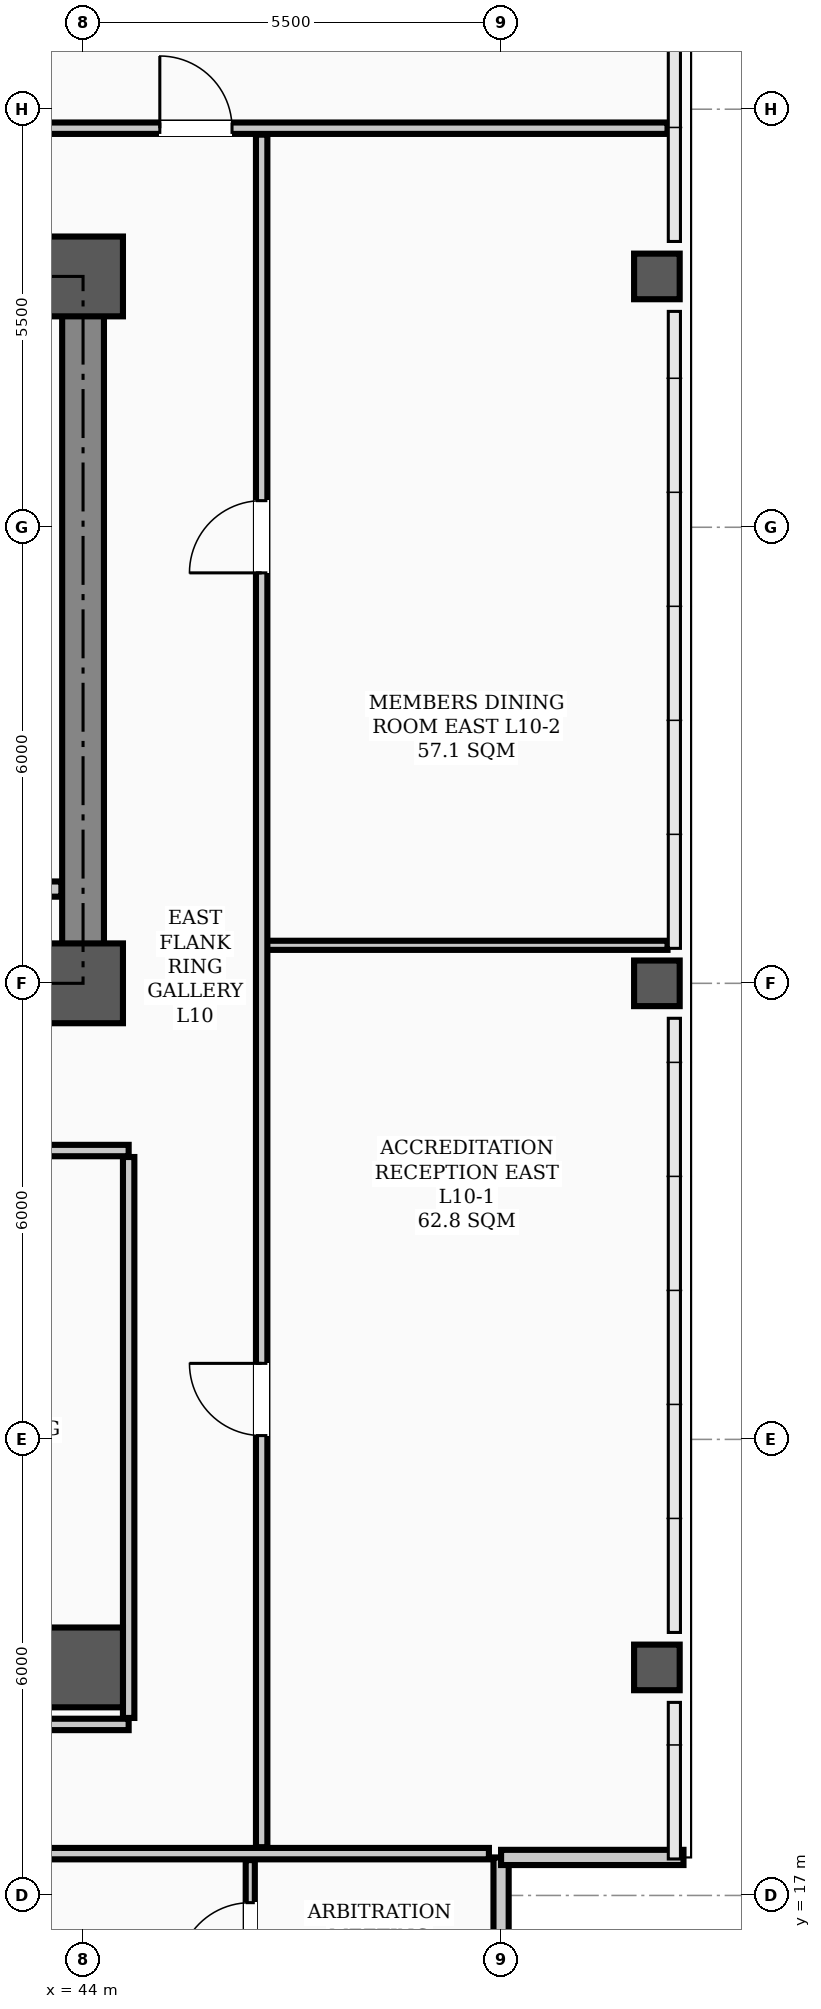
"""IFC4 building model, lengths in metres.
Left out: names, types, materials, properties, quantities, classifications, styles, units other than length and angle.
Written with IfcOpenShell. Run it as: python <this file> out.ifc"""

import sys

from ifc_helpers import new_model, si_unit, direction, frame, frame_2d, origin, origin_2d, place, context, subcontext, project, spatial, rectangle, hollow_rectangle, extrude, element, fill, save


model = new_model("IFC4")
c1 = context("Model", 3, precision=1e-05, world=origin(), true_north=direction((0.0, 1.0)))
c2 = subcontext(c1, "Body", "Model", "MODEL_VIEW")
j1 = project(units=[si_unit("LENGTHUNIT", "METRE"), si_unit("PLANEANGLEUNIT", "RADIAN")], contexts=[c1])
p1 = place(None, origin())
s1 = spatial("IfcSite", under=j1, at=p1, CompositionType="ELEMENT")
p2 = place(p1, origin())
s2 = spatial("IfcBuilding", under=s1, at=p2, CompositionType="ELEMENT")
p3 = place(p2, frame((0.0, 0.0, 42.1)))
s3 = spatial("IfcBuildingStorey", under=s2, at=p3, CompositionType="ELEMENT", Elevation=42.1)
for number, where, z_axis, x_axis in (
    (1, (44.0, 29.0, 0.0), (0.0, 0.0, 1.0), (1.0, 0.0, 0.0)),
    (2, (44.0, 38.3, 0.0), (0.0, 0.0, 1.0), (1.0, 0.0, 0.0)),
    (3, (44.0, 20.0, 0.0), (0.0, 0.0, 1.0), (1.0, 0.0, 0.0)),
):
    element("IfcColumn", number, at=place(p3, frame(where, z_axis=z_axis, x_axis=x_axis)), inside=s3, PredefinedType="COLUMN", context=c2, shape_type="SweptSolid", body=[
        extrude(hollow_rectangle(XDim=1.05, YDim=1.05, WallThickness=0.038, InnerFilletRadius=0.019, OuterFilletRadius=0.057, at=origin_2d()), origin(), (0.0, 0.0, 1.0), 3.9),
    ])
for number, where, z_axis, x_axis in (
    (4, (51.55, 20.0, 0.0), (0.0, 0.0, 1.0), (1.0, 0.0, 0.0)),
    (5, (51.55, 29.0, 0.0), (0.0, 0.0, 1.0), (1.0, 0.0, 0.0)),
    (6, (51.55, 38.3, 0.0), (0.0, 0.0, 1.0), (1.0, 0.0, 0.0)),
):
    element("IfcColumn", number, at=place(p3, frame(where, z_axis=z_axis, x_axis=x_axis)), inside=s3, PredefinedType="COLUMN", context=c2, shape_type="SweptSolid", body=[
        extrude(hollow_rectangle(XDim=0.6, YDim=0.6, WallThickness=0.026, InnerFilletRadius=0.013, OuterFilletRadius=0.039, at=origin_2d()), origin(), (0.0, 0.0, 1.0), 3.9),
    ])
for number, where, z_axis, x_axis in (
    (7, (49.5, 15.1, 0.0), (0.0, 0.0, 1.0), (0.0, 1.0, 0.0)),
    (8, (49.5, 17.5, 0.0), (0.0, 0.0, 1.0), (1.0, 0.0, 0.0)),
):
    element("IfcWall", number, at=place(p3, frame(where, z_axis=z_axis, x_axis=x_axis)), inside=s3, PredefinedType="PARAPET", context=c2, shape_type="SweptSolid", body=[
        extrude(rectangle(XDim=2.4, YDim=0.2, at=frame_2d((1.2, 0.0))), origin(), (0.0, 0.0, 1.0), 1.2),
    ])
p4 = place(p3, frame((13.5, 29.0, 0.0), z_axis=(0.0, 0.0, 1.0), x_axis=(1.0, 0.0, 0.0)))
e9 = element("IfcWall", 9, at=p4, inside=s3, PredefinedType="SHEAR", context=c2, shape_type="SweptSolid", body=[
    extrude(rectangle(XDim=30.5, YDim=0.55, at=frame_2d((15.25, 0.0))), origin(), (0.0, 0.0, 1.0), 3.72),
])
p5 = place(p4, frame((1.75, 0.0, 0.0)))
e10 = element("IfcOpeningElement", 10, at=p5, cuts=e9, PredefinedType="OPENING", context=c2, shape_type="SweptSolid", body=[
    extrude(rectangle(XDim=1.1, YDim=2.08, at=frame_2d((0.55, 1.04))), frame((0.0, 0.285, 0.0), z_axis=(0.0, -1.0, 0.0), x_axis=(1.0, 0.0, 0.0)), (0.0, 0.0, 1.0), 0.57),
])
p6 = place(p4, frame((26.7, 0.0, 0.0)))
e11 = element("IfcOpeningElement", 11, at=p6, cuts=e9, PredefinedType="OPENING", context=c2, shape_type="SweptSolid", body=[
    extrude(rectangle(XDim=1.1, YDim=2.08, at=frame_2d((0.55, 1.04))), frame((0.0, 0.285, 0.0), z_axis=(0.0, -1.0, 0.0), x_axis=(1.0, 0.0, 0.0)), (0.0, 0.0, 1.0), 0.57),
])
p7 = place(p4, frame((6.8, 0.0, 0.0)))
e12 = element("IfcOpeningElement", 12, at=p7, cuts=e9, PredefinedType="OPENING", context=c2, shape_type="SweptSolid", body=[
    extrude(rectangle(XDim=1.1, YDim=2.08, at=frame_2d((0.55, 1.04))), frame((0.0, 0.285, 0.0), z_axis=(0.0, -1.0, 0.0), x_axis=(1.0, 0.0, 0.0)), (0.0, 0.0, 1.0), 0.57),
])
p8 = place(p4, frame((13.2, 0.0, 0.0)))
e13 = element("IfcOpeningElement", 13, at=p8, cuts=e9, PredefinedType="OPENING", context=c2, shape_type="SweptSolid", body=[
    extrude(rectangle(XDim=1.6, YDim=2.08, at=frame_2d((0.8, 1.04))), frame((0.0, 0.285, 0.0), z_axis=(0.0, -1.0, 0.0), x_axis=(1.0, 0.0, 0.0)), (0.0, 0.0, 1.0), 0.57),
])
p9 = place(p4, frame((20.525, 0.0, 0.0)))
e14 = element("IfcOpeningElement", 14, at=p9, cuts=e9, PredefinedType="OPENING", context=c2, shape_type="SweptSolid", body=[
    extrude(rectangle(XDim=0.95, YDim=2.08, at=frame_2d((0.475, 1.04))), frame((0.0, 0.285, 0.0), z_axis=(0.0, -1.0, 0.0), x_axis=(1.0, 0.0, 0.0)), (0.0, 0.0, 1.0), 0.57),
])
p10 = place(p3, frame((13.5, 38.3, 0.0), z_axis=(0.0, 0.0, 1.0), x_axis=(1.0, 0.0, 0.0)))
e15 = element("IfcWall", 15, at=p10, inside=s3, PredefinedType="SHEAR", context=c2, shape_type="SweptSolid", body=[
    extrude(rectangle(XDim=30.5, YDim=0.55, at=frame_2d((15.25, 0.0))), origin(), (0.0, 0.0, 1.0), 3.72),
])
p11 = place(p3, frame((44.0, 29.35, 0.0), z_axis=(0.0, 0.0, 1.0), x_axis=(0.0, 1.0, 0.0)))
e16 = element("IfcWall", 16, at=p11, inside=s3, PredefinedType="SHEAR", context=c2, shape_type="SweptSolid", body=[
    extrude(rectangle(XDim=8.6, YDim=0.55, at=frame_2d((4.3, 0.0))), origin(), (0.0, 0.0, 1.0), 3.72),
])
p12 = place(p3, frame((42.4, 30.24, 0.0), z_axis=(0.0, 0.0, 1.0), x_axis=(1.0, 0.0, 0.0)))
e17 = element("IfcWall", 17, at=p12, inside=s3, PredefinedType="STANDARD", context=c2, shape_type="SweptSolid", body=[
    extrude(rectangle(XDim=1.315, YDim=0.2, at=frame_2d((0.658, 0.0))), origin(), (0.0, 0.0, 1.0), 3.1),
])
p13 = place(p3, frame((12.9, 26.8, 0.0), z_axis=(0.0, 0.0, 1.0), x_axis=(1.0, 0.0, 0.0)))
e18 = element("IfcWall", 18, at=p13, inside=s3, PredefinedType="PARTITIONING", context=c2, shape_type="SweptSolid", body=[
    extrude(rectangle(XDim=31.7, YDim=0.15, at=frame_2d((15.85, 0.0))), origin(), (0.0, 0.0, 1.0), 3.1),
])
p14 = place(p13, frame((13.6, 0.0, 0.0)))
e19 = element("IfcOpeningElement", 19, at=p14, cuts=e18, PredefinedType="OPENING", context=c2, shape_type="SweptSolid", body=[
    extrude(rectangle(XDim=1.6, YDim=2.08, at=frame_2d((0.8, 1.04))), frame((0.0, 0.085, 0.0), z_axis=(0.0, -1.0, 0.0), x_axis=(1.0, 0.0, 0.0)), (0.0, 0.0, 1.0), 0.17),
])
p15 = place(p13, frame((2.875, 0.0, 0.0)))
e20 = element("IfcOpeningElement", 20, at=p15, cuts=e18, PredefinedType="OPENING", context=c2, shape_type="SweptSolid", body=[
    extrude(rectangle(XDim=0.95, YDim=2.08, at=frame_2d((0.475, 1.04))), frame((0.0, 0.085, 0.0), z_axis=(0.0, -1.0, 0.0), x_axis=(1.0, 0.0, 0.0)), (0.0, 0.0, 1.0), 0.17),
])
p16 = place(p13, frame((8.625, 0.0, 0.0)))
e21 = element("IfcOpeningElement", 21, at=p16, cuts=e18, PredefinedType="OPENING", context=c2, shape_type="SweptSolid", body=[
    extrude(rectangle(XDim=0.95, YDim=2.08, at=frame_2d((0.475, 1.04))), frame((0.0, 0.085, 0.0), z_axis=(0.0, -1.0, 0.0), x_axis=(1.0, 0.0, 0.0)), (0.0, 0.0, 1.0), 0.17),
])
p17 = place(p13, frame((16.075, 0.0, 0.0)))
e22 = element("IfcOpeningElement", 22, at=p17, cuts=e18, PredefinedType="OPENING", context=c2, shape_type="SweptSolid", body=[
    extrude(rectangle(XDim=0.95, YDim=2.08, at=frame_2d((0.475, 1.04))), frame((0.0, 0.085, 0.0), z_axis=(0.0, -1.0, 0.0), x_axis=(1.0, 0.0, 0.0)), (0.0, 0.0, 1.0), 0.17),
])
p18 = place(p13, frame((21.875, 0.0, 0.0)))
e23 = element("IfcOpeningElement", 23, at=p18, cuts=e18, PredefinedType="OPENING", context=c2, shape_type="SweptSolid", body=[
    extrude(rectangle(XDim=0.95, YDim=2.08, at=frame_2d((0.475, 1.04))), frame((0.0, 0.085, 0.0), z_axis=(0.0, -1.0, 0.0), x_axis=(1.0, 0.0, 0.0)), (0.0, 0.0, 1.0), 0.17),
])
p19 = place(p13, frame((29.025, 0.0, 0.0)))
e24 = element("IfcOpeningElement", 24, at=p19, cuts=e18, PredefinedType="OPENING", context=c2, shape_type="SweptSolid", body=[
    extrude(rectangle(XDim=0.95, YDim=2.08, at=frame_2d((0.475, 1.04))), frame((0.0, 0.085, 0.0), z_axis=(0.0, -1.0, 0.0), x_axis=(1.0, 0.0, 0.0)), (0.0, 0.0, 1.0), 0.17),
])
p20 = place(p3, frame((4.66, 17.55, 0.0), z_axis=(0.0, 0.0, 1.0), x_axis=(1.0, 0.0, 0.0)))
e25 = element("IfcWall", 25, at=p20, inside=s3, PredefinedType="PARTITIONING", context=c2, shape_type="SweptSolid", body=[
    extrude(rectangle(XDim=44.68, YDim=0.15, at=frame_2d((22.34, 0.0))), origin(), (0.0, 0.0, 1.0), 3.1),
])
p21 = place(p20, frame((7.34, 0.0, 0.0)))
e26 = element("IfcOpeningElement", 26, at=p21, cuts=e25, PredefinedType="OPENING", context=c2, shape_type="SweptSolid", body=[
    extrude(rectangle(XDim=0.95, YDim=2.08, at=frame_2d((0.475, 1.04))), frame((0.0, 0.085, 0.0), z_axis=(0.0, -1.0, 0.0), x_axis=(1.0, 0.0, 0.0)), (0.0, 0.0, 1.0), 0.17),
])
p22 = place(p20, frame((12.465, 0.0, 0.0)))
e27 = element("IfcOpeningElement", 27, at=p22, cuts=e25, PredefinedType="OPENING", context=c2, shape_type="SweptSolid", body=[
    extrude(rectangle(XDim=0.95, YDim=2.08, at=frame_2d((0.475, 1.04))), frame((0.0, 0.085, 0.0), z_axis=(0.0, -1.0, 0.0), x_axis=(1.0, 0.0, 0.0)), (0.0, 0.0, 1.0), 0.17),
])
p23 = place(p20, frame((29.265, 0.0, 0.0)))
e28 = element("IfcOpeningElement", 28, at=p23, cuts=e25, PredefinedType="OPENING", context=c2, shape_type="SweptSolid", body=[
    extrude(rectangle(XDim=0.95, YDim=2.08, at=frame_2d((0.475, 1.04))), frame((0.0, 0.085, 0.0), z_axis=(0.0, -1.0, 0.0), x_axis=(1.0, 0.0, 0.0)), (0.0, 0.0, 1.0), 0.17),
])
p24 = place(p20, frame((37.265, 0.0, 0.0)))
e29 = element("IfcOpeningElement", 29, at=p24, cuts=e25, PredefinedType="OPENING", context=c2, shape_type="SweptSolid", body=[
    extrude(rectangle(XDim=0.95, YDim=2.08, at=frame_2d((0.475, 1.04))), frame((0.0, 0.085, 0.0), z_axis=(0.0, -1.0, 0.0), x_axis=(1.0, 0.0, 0.0)), (0.0, 0.0, 1.0), 0.17),
])
p25 = place(p3, frame((28.4, 19.25, 0.0), z_axis=(0.0, 0.0, 1.0), x_axis=(1.0, 0.0, 0.0)))
e30 = element("IfcWall", 30, at=p25, inside=s3, PredefinedType="PARTITIONING", context=c2, shape_type="SweptSolid", body=[
    extrude(rectangle(XDim=16.2, YDim=0.15, at=frame_2d((8.1, 0.0))), origin(), (0.0, 0.0, 1.0), 3.1),
])
p26 = place(p3, frame((46.35, 29.5, 0.0), z_axis=(0.0, 0.0, 1.0), x_axis=(1.0, 0.0, 0.0)))
e31 = element("IfcWall", 31, at=p26, inside=s3, PredefinedType="PARTITIONING", context=c2, shape_type="SweptSolid", body=[
    extrude(rectangle(XDim=5.34, YDim=0.12, at=frame_2d((2.67, 0.0))), origin(), (0.0, 0.0, 1.0), 3.0),
])
p27 = place(p3, frame((2.31, 40.25, 0.0), z_axis=(0.0, 0.0, 1.0), x_axis=(1.0, 0.0, 0.0)))
e32 = element("IfcWall", 32, at=p27, inside=s3, PredefinedType="PARTITIONING", context=c2, shape_type="SweptSolid", body=[
    extrude(rectangle(XDim=49.38, YDim=0.15, at=frame_2d((24.69, 0.0))), origin(), (0.0, 0.0, 1.0), 3.1),
])
p28 = place(p27, frame((9.23, 0.0, 0.0)))
e33 = element("IfcOpeningElement", 33, at=p28, cuts=e32, PredefinedType="OPENING", context=c2, shape_type="SweptSolid", body=[
    extrude(rectangle(XDim=0.95, YDim=2.08, at=frame_2d((0.475, 1.04))), frame((0.0, 0.085, 0.0), z_axis=(0.0, -1.0, 0.0), x_axis=(1.0, 0.0, 0.0)), (0.0, 0.0, 1.0), 0.17),
])
p29 = place(p27, frame((23.115, 0.0, 0.0)))
e34 = element("IfcOpeningElement", 34, at=p29, cuts=e32, PredefinedType="OPENING", context=c2, shape_type="SweptSolid", body=[
    extrude(rectangle(XDim=0.95, YDim=2.08, at=frame_2d((0.475, 1.04))), frame((0.0, 0.085, 0.0), z_axis=(0.0, -1.0, 0.0), x_axis=(1.0, 0.0, 0.0)), (0.0, 0.0, 1.0), 0.17),
])
p30 = place(p27, frame((31.515, 0.0, 0.0)))
e35 = element("IfcOpeningElement", 35, at=p30, cuts=e32, PredefinedType="OPENING", context=c2, shape_type="SweptSolid", body=[
    extrude(rectangle(XDim=0.95, YDim=2.08, at=frame_2d((0.475, 1.04))), frame((0.0, 0.085, 0.0), z_axis=(0.0, -1.0, 0.0), x_axis=(1.0, 0.0, 0.0)), (0.0, 0.0, 1.0), 0.17),
])
p31 = place(p27, frame((42.7, 0.0, 0.0)))
e36 = element("IfcOpeningElement", 36, at=p31, cuts=e32, PredefinedType="OPENING", context=c2, shape_type="SweptSolid", body=[
    extrude(rectangle(XDim=0.95, YDim=2.08, at=frame_2d((0.475, 1.04))), frame((0.0, 0.085, 0.0), z_axis=(0.0, -1.0, 0.0), x_axis=(1.0, 0.0, 0.0)), (0.0, 0.0, 1.0), 0.17),
])
p32 = place(p3, frame((46.35, 17.635, 0.0), z_axis=(0.0, 0.0, 1.0), x_axis=(0.0, 1.0, 0.0)))
e37 = element("IfcWall", 37, at=p32, inside=s3, PredefinedType="PARTITIONING", context=c2, shape_type="SweptSolid", body=[
    extrude(rectangle(XDim=22.53, YDim=0.15, at=frame_2d((11.265, 0.0))), origin(), (0.0, 0.0, 1.0), 3.0),
])
p33 = place(p32, frame((5.415, 0.0, 0.0)))
e38 = element("IfcOpeningElement", 38, at=p33, cuts=e37, PredefinedType="OPENING", context=c2, shape_type="SweptSolid", body=[
    extrude(rectangle(XDim=0.95, YDim=2.08, at=frame_2d((0.475, 1.04))), frame((0.0, 0.085, 0.0), z_axis=(0.0, -1.0, 0.0), x_axis=(1.0, 0.0, 0.0)), (0.0, 0.0, 1.0), 0.17),
])
p34 = place(p32, frame((16.765, 0.0, 0.0)))
e39 = element("IfcOpeningElement", 39, at=p34, cuts=e37, PredefinedType="OPENING", context=c2, shape_type="SweptSolid", body=[
    extrude(rectangle(XDim=0.95, YDim=2.08, at=frame_2d((0.475, 1.04))), frame((0.0, 0.085, 0.0), z_axis=(0.0, -1.0, 0.0), x_axis=(1.0, 0.0, 0.0)), (0.0, 0.0, 1.0), 0.17),
])
p35 = place(p3, frame((44.6, 19.335, 0.0), z_axis=(0.0, 0.0, 1.0), x_axis=(0.0, 1.0, 0.0)))
e40 = element("IfcWall", 40, at=p35, inside=s3, PredefinedType="PARTITIONING", context=c2, shape_type="SweptSolid", body=[
    extrude(rectangle(XDim=7.38, YDim=0.15, at=frame_2d((3.69, 0.0))), origin(), (0.0, 0.0, 1.0), 3.0),
])
p36 = place(p3, frame((46.2, 15.31, 0.0), z_axis=(0.0, 0.0, 1.0), x_axis=(0.0, 1.0, 0.0)))
e41 = element("IfcWall", 41, at=p36, inside=s3, PredefinedType="PARTITIONING", context=c2, shape_type="SweptSolid", body=[
    extrude(rectangle(XDim=2.155, YDim=0.12, at=frame_2d((1.078, 0.0))), origin(), (0.0, 0.0, 1.0), 3.72),
])
p37 = place(p36, frame((0.645, 0.0, 0.0)))
e42 = element("IfcOpeningElement", 42, at=p37, cuts=e41, PredefinedType="OPENING", context=c2, shape_type="SweptSolid", body=[
    extrude(rectangle(XDim=0.95, YDim=2.08, at=frame_2d((0.475, 1.04))), frame((0.0, 0.07, 0.0), z_axis=(0.0, -1.0, 0.0), x_axis=(1.0, 0.0, 0.0)), (0.0, 0.0, 1.0), 0.14),
])
p38 = place(p37, origin())
e43 = element("IfcDoor", 43, at=p38, inside=s3, OperationType="SINGLE_SWING_LEFT", PredefinedType="DOOR", context=c2, shape_type="SweptSolid", body=[
    extrude(rectangle(XDim=0.95, YDim=2.08, at=frame_2d((0.475, 1.04))), frame((0.0, 0.025, 0.0), z_axis=(0.0, -1.0, 0.0), x_axis=(1.0, 0.0, 0.0)), (0.0, 0.0, 1.0), 0.05),
])
fill(e42, e43)
p39 = place(p33, origin())
e44 = element("IfcDoor", 44, at=p39, inside=s3, OperationType="SINGLE_SWING_RIGHT", PredefinedType="DOOR", context=c2, shape_type="SweptSolid", body=[
    extrude(rectangle(XDim=0.95, YDim=2.08, at=frame_2d((0.475, 1.04))), frame((0.0, 0.025, 0.0), z_axis=(0.0, -1.0, 0.0), x_axis=(1.0, 0.0, 0.0)), (0.0, 0.0, 1.0), 0.05),
])
fill(e38, e44)
p40 = place(p34, origin())
e45 = element("IfcDoor", 45, at=p40, inside=s3, OperationType="SINGLE_SWING_LEFT", PredefinedType="DOOR", context=c2, shape_type="SweptSolid", body=[
    extrude(rectangle(XDim=0.95, YDim=2.08, at=frame_2d((0.475, 1.04))), frame((0.0, 0.025, 0.0), z_axis=(0.0, -1.0, 0.0), x_axis=(1.0, 0.0, 0.0)), (0.0, 0.0, 1.0), 0.05),
])
fill(e39, e45)
p41 = place(p31, origin())
e46 = element("IfcDoor", 46, at=p41, inside=s3, OperationType="SINGLE_SWING_LEFT", PredefinedType="DOOR", context=c2, shape_type="SweptSolid", body=[
    extrude(rectangle(XDim=0.95, YDim=2.08, at=frame_2d((0.475, 1.04))), frame((0.0, 0.025, 0.0), z_axis=(0.0, -1.0, 0.0), x_axis=(1.0, 0.0, 0.0)), (0.0, 0.0, 1.0), 0.05),
])
fill(e36, e46)
save(model, sys.argv[1])
